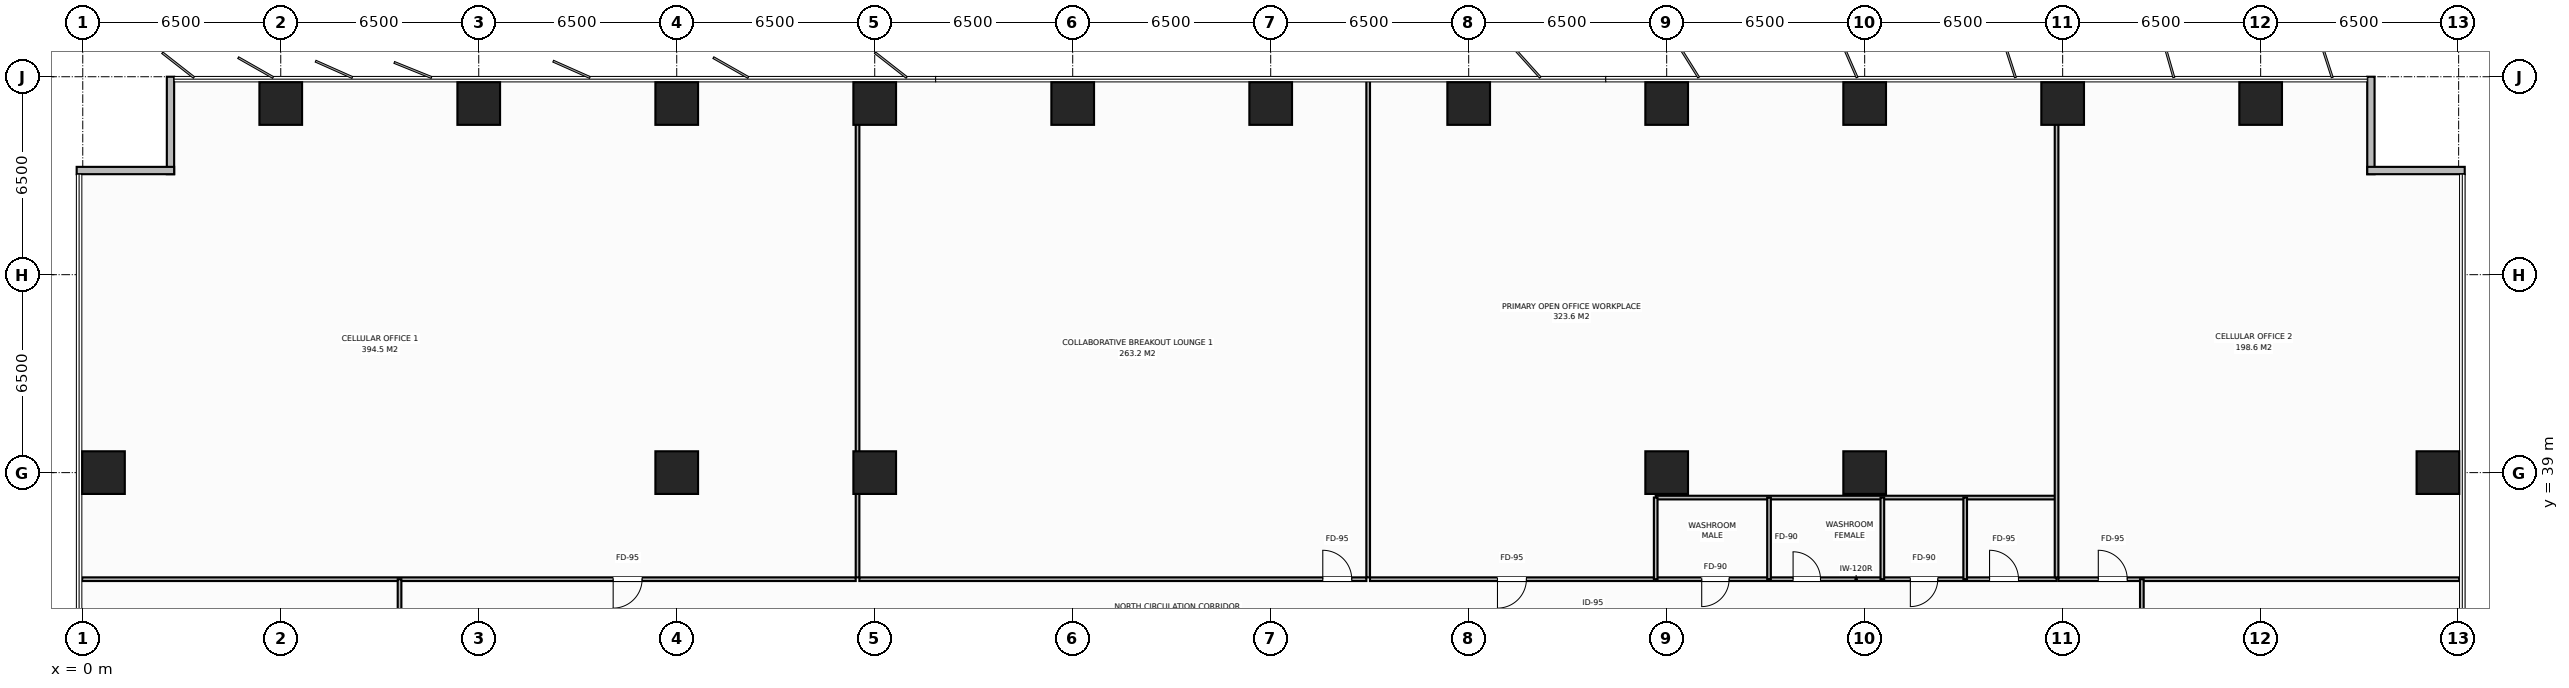
"""IFC4 building model, lengths in metres.
Left out: names, types, materials, properties, quantities, classifications, styles, units other than length and angle.
Written with IfcOpenShell. Run it as: python <this file> out.ifc"""

import sys

from ifc_helpers import new_model, si_unit, direction, frame, frame_2d, origin, origin_2d, place, context, subcontext, project, spatial, rectangle, extrude, element, fill, save


model = new_model("IFC4")
c1 = context("Model", 3, precision=1e-05, world=origin(), true_north=direction((0.0, 1.0)))
c2 = subcontext(c1, "Body", "Model", "MODEL_VIEW")
j1 = project(units=[si_unit("LENGTHUNIT", "METRE"), si_unit("PLANEANGLEUNIT", "RADIAN")], contexts=[c1])
p1 = place(None, origin())
s1 = spatial("IfcSite", under=j1, at=p1, CompositionType="ELEMENT")
p2 = place(p1, origin())
s2 = spatial("IfcBuilding", under=s1, at=p2, CompositionType="ELEMENT")
p3 = place(p2, frame((0.0, 0.0, 54.4)))
s3 = spatial("IfcBuildingStorey", under=s2, at=p3, CompositionType="ELEMENT", Elevation=54.4)
for number, where, z_axis, x_axis in (
    (1, (19.5, 39.0, 0.0), (0.0, 0.0, 1.0), (1.0, 0.0, 0.0)),
    (2, (58.5, 39.0, 0.0), (0.0, 0.0, 1.0), (1.0, 0.0, 0.0)),
    (3, (26.0, 39.0, 0.0), (0.0, 0.0, 1.0), (1.0, 0.0, 0.0)),
    (4, (52.0, 39.0, 0.0), (0.0, 0.0, 1.0), (1.0, 0.0, 0.0)),
    (5, (6.5, 51.12, 0.0), (0.0, 0.0, 1.0), (1.0, 0.0, 0.0)),
    (6, (13.0, 51.12, 0.0), (0.0, 0.0, 1.0), (1.0, 0.0, 0.0)),
    (7, (19.5, 51.12, 0.0), (0.0, 0.0, 1.0), (1.0, 0.0, 0.0)),
    (8, (26.0, 51.12, 0.0), (0.0, 0.0, 1.0), (1.0, 0.0, 0.0)),
    (9, (32.5, 51.12, 0.0), (0.0, 0.0, 1.0), (1.0, 0.0, 0.0)),
    (10, (39.0, 51.12, 0.0), (0.0, 0.0, 1.0), (1.0, 0.0, 0.0)),
    (11, (45.5, 51.12, 0.0), (0.0, 0.0, 1.0), (1.0, 0.0, 0.0)),
    (12, (52.0, 51.12, 0.0), (0.0, 0.0, 1.0), (1.0, 0.0, 0.0)),
    (13, (58.5, 51.12, 0.0), (0.0, 0.0, 1.0), (1.0, 0.0, 0.0)),
    (14, (65.0, 51.12, 0.0), (0.0, 0.0, 1.0), (1.0, 0.0, 0.0)),
    (15, (71.5, 51.12, 0.0), (0.0, 0.0, 1.0), (1.0, 0.0, 0.0)),
    (16, (0.68, 39.0, 0.0), (0.0, 0.0, 1.0), (1.0, 0.0, 0.0)),
    (17, (77.32, 39.0, 0.0), (0.0, 0.0, 1.0), (1.0, 0.0, 0.0)),
):
    element("IfcColumn", number, at=place(p3, frame(where, z_axis=z_axis, x_axis=x_axis)), inside=s3, PredefinedType="COLUMN", context=c2, shape_type="SweptSolid", body=[
        extrude(rectangle(XDim=1.4, YDim=1.4, at=origin_2d()), origin(), (0.0, 0.0, 1.0), 3.8),
    ])
for number, where, z_axis, x_axis in (
    (18, (2.88, 48.8, 0.0), (0.0, 0.0, 1.0), (0.0, 1.0, 0.0)),
    (19, (-0.2, 48.92, 0.0), (0.0, 0.0, 1.0), (1.0, 0.0, 0.0)),
    (20, (75.12, 52.0, 0.0), (0.0, 0.0, 1.0), (0.0, -1.0, 0.0)),
    (21, (75.0, 48.92, 0.0), (0.0, 0.0, 1.0), (1.0, 0.0, 0.0)),
):
    element("IfcWall", number, at=place(p3, frame(where, z_axis=z_axis, x_axis=x_axis)), inside=s3, PredefinedType="STANDARD", context=c2, shape_type="SweptSolid", body=[
        extrude(rectangle(XDim=3.2, YDim=0.24, at=frame_2d((1.6, 0.0))), origin(), (0.0, 0.0, 1.0), 3.55),
    ])
p4 = place(p3, frame((51.64, 35.5, 0.0), z_axis=(0.0, 0.0, 1.0), x_axis=(1.0, 0.0, 0.0)))
e22 = element("IfcWall", 22, at=p4, inside=s3, PredefinedType="PARTITIONING", context=c2, shape_type="SweptSolid", body=[
    extrude(rectangle(XDim=13.16, YDim=0.12, at=frame_2d((6.58, 0.0))), origin(), (0.0, 0.0, 1.0), 3.55),
])
p5 = place(p4, frame((1.51, 0.0, 0.0)))
e23 = element("IfcOpeningElement", 23, at=p5, cuts=e22, PredefinedType="OPENING", context=c2, shape_type="SweptSolid", body=[
    extrude(rectangle(XDim=0.9, YDim=2.15, at=frame_2d((0.45, 1.075))), frame((0.0, 0.07, 0.0), z_axis=(0.0, -1.0, 0.0), x_axis=(1.0, 0.0, 0.0)), (0.0, 0.0, 1.0), 0.14),
])
p6 = place(p4, frame((4.51, 0.0, 0.0)))
e24 = element("IfcOpeningElement", 24, at=p6, cuts=e22, PredefinedType="OPENING", context=c2, shape_type="SweptSolid", body=[
    extrude(rectangle(XDim=0.9, YDim=2.15, at=frame_2d((0.45, 1.075))), frame((0.0, 0.07, 0.0), z_axis=(0.0, -1.0, 0.0), x_axis=(1.0, 0.0, 0.0)), (0.0, 0.0, 1.0), 0.14),
])
p7 = place(p4, frame((8.36, 0.0, 0.0)))
e25 = element("IfcOpeningElement", 25, at=p7, cuts=e22, PredefinedType="OPENING", context=c2, shape_type="SweptSolid", body=[
    extrude(rectangle(XDim=0.9, YDim=2.15, at=frame_2d((0.45, 1.075))), frame((0.0, 0.07, 0.0), z_axis=(0.0, -1.0, 0.0), x_axis=(1.0, 0.0, 0.0)), (0.0, 0.0, 1.0), 0.14),
])
p8 = place(p4, frame((10.96, 0.0, 0.0)))
e26 = element("IfcOpeningElement", 26, at=p8, cuts=e22, PredefinedType="OPENING", context=c2, shape_type="SweptSolid", body=[
    extrude(rectangle(XDim=0.95, YDim=2.15, at=frame_2d((0.475, 1.075))), frame((0.0, 0.07, 0.0), z_axis=(0.0, -1.0, 0.0), x_axis=(1.0, 0.0, 0.0)), (0.0, 0.0, 1.0), 0.14),
])
p9 = place(p3, frame((51.64, 38.18, 0.0), z_axis=(0.0, 0.0, 1.0), x_axis=(1.0, 0.0, 0.0)))
e27 = element("IfcWall", 27, at=p9, inside=s3, PredefinedType="PARTITIONING", context=c2, shape_type="SweptSolid", body=[
    extrude(rectangle(XDim=13.16, YDim=0.12, at=frame_2d((6.58, 0.0))), origin(), (0.0, 0.0, 1.0), 3.55),
])
for number, where, z_axis, x_axis in (
    (28, (51.64, 35.5, 0.0), (0.0, 0.0, 1.0), (0.0, 1.0, 0.0)),
    (29, (55.36, 35.5, 0.0), (0.0, 0.0, 1.0), (0.0, 1.0, 0.0)),
    (30, (59.08, 35.5, 0.0), (0.0, 0.0, 1.0), (0.0, 1.0, 0.0)),
    (31, (61.8, 35.5, 0.0), (0.0, 0.0, 1.0), (0.0, 1.0, 0.0)),
):
    element("IfcWall", number, at=place(p3, frame(where, z_axis=z_axis, x_axis=x_axis)), inside=s3, PredefinedType="PARTITIONING", context=c2, shape_type="SweptSolid", body=[
        extrude(rectangle(XDim=2.68, YDim=0.12, at=frame_2d((1.34, 0.0))), origin(), (0.0, 0.0, 1.0), 3.55),
    ])
p10 = place(p3, frame((25.436, 35.56, 0.0), z_axis=(0.0, 0.0, 1.0), x_axis=(0.0, 1.0, 0.0)))
e32 = element("IfcWall", 32, at=p10, inside=s3, PredefinedType="PARTITIONING", context=c2, shape_type="SweptSolid", body=[
    extrude(rectangle(XDim=16.42, YDim=0.12, at=frame_2d((8.21, 0.0))), origin(), (0.0, 0.0, 1.0), 3.55),
])
p11 = place(p3, frame((-0.02, 35.5, 0.0), z_axis=(0.0, 0.0, 1.0), x_axis=(1.0, 0.0, 0.0)))
e33 = element("IfcWall", 33, at=p11, inside=s3, PredefinedType="PARTITIONING", context=c2, shape_type="SweptSolid", body=[
    extrude(rectangle(XDim=25.396, YDim=0.12, at=frame_2d((12.698, 0.0))), origin(), (0.0, 0.0, 1.0), 3.55),
])
p12 = place(p11, frame((17.433, 0.0, 0.0)))
e34 = element("IfcOpeningElement", 34, at=p12, cuts=e33, PredefinedType="OPENING", context=c2, shape_type="SweptSolid", body=[
    extrude(rectangle(XDim=0.95, YDim=2.15, at=frame_2d((0.475, 1.075))), frame((0.0, 0.07, 0.0), z_axis=(0.0, -1.0, 0.0), x_axis=(1.0, 0.0, 0.0)), (0.0, 0.0, 1.0), 0.14),
])
p13 = place(p3, frame((42.2, 35.56, 0.0), z_axis=(0.0, 0.0, 1.0), x_axis=(0.0, 1.0, 0.0)))
e35 = element("IfcWall", 35, at=p13, inside=s3, PredefinedType="PARTITIONING", context=c2, shape_type="SweptSolid", body=[
    extrude(rectangle(XDim=16.42, YDim=0.12, at=frame_2d((8.21, 0.0))), origin(), (0.0, 0.0, 1.0), 3.55),
])
p14 = place(p3, frame((25.496, 35.5, 0.0), z_axis=(0.0, 0.0, 1.0), x_axis=(1.0, 0.0, 0.0)))
e36 = element("IfcWall", 36, at=p14, inside=s3, PredefinedType="PARTITIONING", context=c2, shape_type="SweptSolid", body=[
    extrude(rectangle(XDim=16.644, YDim=0.12, at=frame_2d((8.322, 0.0))), origin(), (0.0, 0.0, 1.0), 3.55),
])
p15 = place(p14, frame((15.214, 0.0, 0.0)))
e37 = element("IfcOpeningElement", 37, at=p15, cuts=e36, PredefinedType="OPENING", context=c2, shape_type="SweptSolid", body=[
    extrude(rectangle(XDim=0.95, YDim=2.15, at=frame_2d((0.475, 1.075))), frame((0.0, 0.07, 0.0), z_axis=(0.0, -1.0, 0.0), x_axis=(1.0, 0.0, 0.0)), (0.0, 0.0, 1.0), 0.14),
])
p16 = place(p3, frame((64.8, 35.56, 0.0), z_axis=(0.0, 0.0, 1.0), x_axis=(0.0, 1.0, 0.0)))
e38 = element("IfcWall", 38, at=p16, inside=s3, PredefinedType="PARTITIONING", context=c2, shape_type="SweptSolid", body=[
    extrude(rectangle(XDim=16.42, YDim=0.12, at=frame_2d((8.21, 0.0))), origin(), (0.0, 0.0, 1.0), 2.9),
])
p17 = place(p3, frame((42.26, 35.5, 0.0), z_axis=(0.0, 0.0, 1.0), x_axis=(1.0, 0.0, 0.0)))
e39 = element("IfcWall", 39, at=p17, inside=s3, PredefinedType="PARTITIONING", context=c2, shape_type="SweptSolid", body=[
    extrude(rectangle(XDim=9.32, YDim=0.12, at=frame_2d((4.66, 0.0))), origin(), (0.0, 0.0, 1.0), 3.55),
])
p18 = place(p17, frame((4.185, 0.0, 0.0)))
e40 = element("IfcOpeningElement", 40, at=p18, cuts=e39, PredefinedType="OPENING", context=c2, shape_type="SweptSolid", body=[
    extrude(rectangle(XDim=0.95, YDim=2.15, at=frame_2d((0.475, 1.075))), frame((0.0, 0.07, 0.0), z_axis=(0.0, -1.0, 0.0), x_axis=(1.0, 0.0, 0.0)), (0.0, 0.0, 1.0), 0.14),
])
p19 = place(p3, frame((64.86, 35.5, 0.0), z_axis=(0.0, 0.0, 1.0), x_axis=(1.0, 0.0, 0.0)))
e41 = element("IfcWall", 41, at=p19, inside=s3, PredefinedType="PARTITIONING", context=c2, shape_type="SweptSolid", body=[
    extrude(rectangle(XDim=13.16, YDim=0.12, at=frame_2d((6.58, 0.0))), origin(), (0.0, 0.0, 1.0), 3.55),
])
p20 = place(p19, frame((1.31, 0.0, 0.0)))
e42 = element("IfcOpeningElement", 42, at=p20, cuts=e41, PredefinedType="OPENING", context=c2, shape_type="SweptSolid", body=[
    extrude(rectangle(XDim=0.95, YDim=2.15, at=frame_2d((0.475, 1.075))), frame((0.0, 0.07, 0.0), z_axis=(0.0, -1.0, 0.0), x_axis=(1.0, 0.0, 0.0)), (0.0, 0.0, 1.0), 0.14),
])
p21 = place(p3, frame((10.4, 29.167, 0.0), z_axis=(0.0, 0.0, 1.0), x_axis=(0.0, 1.0, 0.0)))
e43 = element("IfcWall", 43, at=p21, inside=s3, PredefinedType="PARTITIONING", context=c2, shape_type="SweptSolid", body=[
    extrude(rectangle(XDim=6.333, YDim=0.12, at=frame_2d((3.167, 0.0))), origin(), (0.0, 0.0, 1.0), 3.55),
])
p22 = place(p21, frame((1.642, 0.0, 0.0)))
e44 = element("IfcOpeningElement", 44, at=p22, cuts=e43, PredefinedType="OPENING", context=c2, shape_type="SweptSolid", body=[
    extrude(rectangle(XDim=0.95, YDim=2.15, at=frame_2d((0.475, 1.075))), frame((0.0, 0.07, 0.0), z_axis=(0.0, -1.0, 0.0), x_axis=(1.0, 0.0, 0.0)), (0.0, 0.0, 1.0), 0.14),
])
p23 = place(p3, frame((67.6, 16.5, 0.0), z_axis=(0.0, 0.0, 1.0), x_axis=(0.0, 1.0, 0.0)))
e45 = element("IfcWall", 45, at=p23, inside=s3, PredefinedType="PARTITIONING", context=c2, shape_type="SweptSolid", body=[
    extrude(rectangle(XDim=19.0, YDim=0.12, at=frame_2d((9.5, 0.0))), origin(), (0.0, 0.0, 1.0), 3.55),
])
p24 = place(p23, frame((9.025, 0.0, 0.0)))
e46 = element("IfcOpeningElement", 46, at=p24, cuts=e45, PredefinedType="OPENING", context=c2, shape_type="SweptSolid", body=[
    extrude(rectangle(XDim=0.95, YDim=2.15, at=frame_2d((0.475, 1.075))), frame((0.0, 0.07, 0.0), z_axis=(0.0, -1.0, 0.0), x_axis=(1.0, 0.0, 0.0)), (0.0, 0.0, 1.0), 0.14),
])
p25 = place(p5, origin())
e47 = element("IfcDoor", 47, at=p25, inside=s3, OperationType="SINGLE_SWING_RIGHT", PredefinedType="DOOR", context=c2, shape_type="SweptSolid", body=[
    extrude(rectangle(XDim=0.9, YDim=2.15, at=frame_2d((0.45, 1.075))), frame((0.0, 0.025, 0.0), z_axis=(0.0, -1.0, 0.0), x_axis=(1.0, 0.0, 0.0)), (0.0, 0.0, 1.0), 0.05),
])
fill(e23, e47)
p26 = place(p6, origin())
e48 = element("IfcDoor", 48, at=p26, inside=s3, OperationType="SINGLE_SWING_LEFT", PredefinedType="DOOR", context=c2, shape_type="SweptSolid", body=[
    extrude(rectangle(XDim=0.9, YDim=2.15, at=frame_2d((0.45, 1.075))), frame((0.0, 0.025, 0.0), z_axis=(0.0, -1.0, 0.0), x_axis=(1.0, 0.0, 0.0)), (0.0, 0.0, 1.0), 0.05),
])
fill(e24, e48)
p27 = place(p7, origin())
e49 = element("IfcDoor", 49, at=p27, inside=s3, OperationType="SINGLE_SWING_RIGHT", PredefinedType="DOOR", context=c2, shape_type="SweptSolid", body=[
    extrude(rectangle(XDim=0.9, YDim=2.15, at=frame_2d((0.45, 1.075))), frame((0.0, 0.025, 0.0), z_axis=(0.0, -1.0, 0.0), x_axis=(1.0, 0.0, 0.0)), (0.0, 0.0, 1.0), 0.05),
])
fill(e25, e49)
p28 = place(p8, origin())
e50 = element("IfcDoor", 50, at=p28, inside=s3, OperationType="SINGLE_SWING_LEFT", PredefinedType="DOOR", context=c2, shape_type="SweptSolid", body=[
    extrude(rectangle(XDim=0.95, YDim=2.15, at=frame_2d((0.475, 1.075))), frame((0.0, 0.025, 0.0), z_axis=(0.0, -1.0, 0.0), x_axis=(1.0, 0.0, 0.0)), (0.0, 0.0, 1.0), 0.05),
])
fill(e26, e50)
p29 = place(p12, origin())
e51 = element("IfcDoor", 51, at=p29, inside=s3, OperationType="SINGLE_SWING_RIGHT", PredefinedType="DOOR", context=c2, shape_type="SweptSolid", body=[
    extrude(rectangle(XDim=0.95, YDim=2.15, at=frame_2d((0.475, 1.075))), frame((0.0, 0.025, 0.0), z_axis=(0.0, -1.0, 0.0), x_axis=(1.0, 0.0, 0.0)), (0.0, 0.0, 1.0), 0.05),
])
fill(e34, e51)
p30 = place(p15, origin())
e52 = element("IfcDoor", 52, at=p30, inside=s3, OperationType="SINGLE_SWING_LEFT", PredefinedType="DOOR", context=c2, shape_type="SweptSolid", body=[
    extrude(rectangle(XDim=0.95, YDim=2.15, at=frame_2d((0.475, 1.075))), frame((0.0, 0.025, 0.0), z_axis=(0.0, -1.0, 0.0), x_axis=(1.0, 0.0, 0.0)), (0.0, 0.0, 1.0), 0.05),
])
fill(e37, e52)
p31 = place(p18, origin())
e53 = element("IfcDoor", 53, at=p31, inside=s3, OperationType="SINGLE_SWING_RIGHT", PredefinedType="DOOR", context=c2, shape_type="SweptSolid", body=[
    extrude(rectangle(XDim=0.95, YDim=2.15, at=frame_2d((0.475, 1.075))), frame((0.0, 0.025, 0.0), z_axis=(0.0, -1.0, 0.0), x_axis=(1.0, 0.0, 0.0)), (0.0, 0.0, 1.0), 0.05),
])
fill(e40, e53)
p32 = place(p20, origin())
e54 = element("IfcDoor", 54, at=p32, inside=s3, OperationType="SINGLE_SWING_LEFT", PredefinedType="DOOR", context=c2, shape_type="SweptSolid", body=[
    extrude(rectangle(XDim=0.95, YDim=2.15, at=frame_2d((0.475, 1.075))), frame((0.0, 0.025, 0.0), z_axis=(0.0, -1.0, 0.0), x_axis=(1.0, 0.0, 0.0)), (0.0, 0.0, 1.0), 0.05),
])
fill(e42, e54)
save(model, sys.argv[1])
